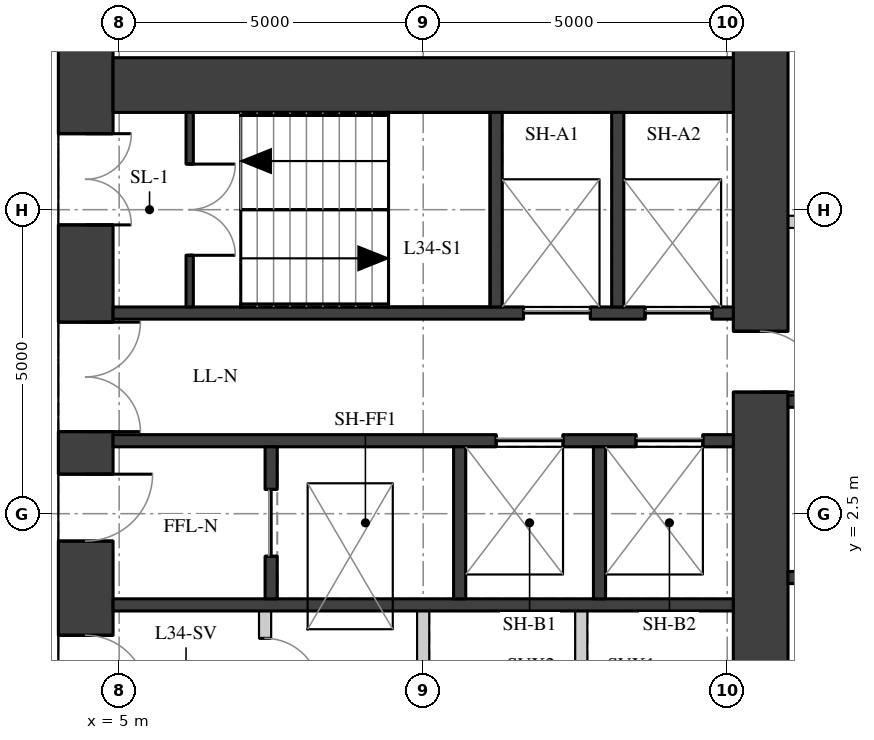
"""IFC4 building model, lengths in metres.
Left out: names, types, materials, properties, quantities, classifications, styles, units other than length and angle.
Written with IfcOpenShell. Run it as: python <this file> out.ifc"""

import sys

from ifc_helpers import new_model, si_unit, direction, frame, frame_2d, origin, place, context, subcontext, project, spatial, rectangle, extrude, element, fill, save


model = new_model("IFC4")
c1 = context("Model", 3, precision=1e-05, world=origin(), true_north=direction((0.0, 1.0)))
c2 = subcontext(c1, "Body", "Model", "MODEL_VIEW")
j1 = project(units=[si_unit("LENGTHUNIT", "METRE"), si_unit("PLANEANGLEUNIT", "RADIAN")], contexts=[c1])
p1 = place(None, origin())
s1 = spatial("IfcSite", under=j1, at=p1, CompositionType="ELEMENT")
p2 = place(p1, origin())
s2 = spatial("IfcBuilding", under=s1, at=p2, CompositionType="ELEMENT")
p3 = place(p2, frame((0.0, 0.0, 121.9)))
s3 = spatial("IfcBuildingStorey", under=s2, at=p3, CompositionType="ELEMENT", Elevation=121.9)
p4 = place(p3, frame((4.45, -11.1, 0.0), z_axis=(0.0, 0.0, 1.0), x_axis=(0.0, 1.0, 0.0)))
e1 = element("IfcWall", 1, at=p4, inside=s3, PredefinedType="SHEAR", context=c2, shape_type="SweptSolid", body=[
    extrude(rectangle(XDim=22.2, YDim=0.9, at=frame_2d((11.1, 0.0))), origin(), (0.0, 0.0, 1.0), 3.02),
])
p5 = place(p4, frame((2.35, 0.0, 0.0)))
e2 = element("IfcOpeningElement", 2, at=p5, cuts=e1, PredefinedType="OPENING", context=c2, shape_type="SweptSolid", body=[
    extrude(rectangle(XDim=1.5, YDim=2.1, at=frame_2d((0.75, 1.05))), frame((0.0, 0.46, 0.0), z_axis=(0.0, -1.0, 0.0), x_axis=(1.0, 0.0, 0.0)), (0.0, 0.0, 1.0), 0.92),
])
p6 = place(p4, frame((5.45, 0.0, 0.0)))
e3 = element("IfcOpeningElement", 3, at=p6, cuts=e1, PredefinedType="OPENING", context=c2, shape_type="SweptSolid", body=[
    extrude(rectangle(XDim=1.8, YDim=2.1, at=frame_2d((0.9, 1.05))), frame((0.0, 0.46, 0.0), z_axis=(0.0, -1.0, 0.0), x_axis=(1.0, 0.0, 0.0)), (0.0, 0.0, 1.0), 0.92),
])
p7 = place(p4, frame((7.95, 0.0, 0.0)))
e4 = element("IfcOpeningElement", 4, at=p7, cuts=e1, PredefinedType="OPENING", context=c2, shape_type="SweptSolid", body=[
    extrude(rectangle(XDim=1.1, YDim=2.1, at=frame_2d((0.55, 1.05))), frame((0.0, 0.46, 0.0), z_axis=(0.0, -1.0, 0.0), x_axis=(1.0, 0.0, 0.0)), (0.0, 0.0, 1.0), 0.92),
])
p8 = place(p4, frame((10.6, 0.0, 0.0)))
e5 = element("IfcOpeningElement", 5, at=p8, cuts=e1, PredefinedType="OPENING", context=c2, shape_type="SweptSolid", body=[
    extrude(rectangle(XDim=1.0, YDim=2.1, at=frame_2d((0.5, 1.05))), frame((0.0, 0.46, 0.0), z_axis=(0.0, -1.0, 0.0), x_axis=(1.0, 0.0, 0.0)), (0.0, 0.0, 1.0), 0.92),
])
p9 = place(p4, frame((13.15, 0.0, 0.0)))
e6 = element("IfcOpeningElement", 6, at=p9, cuts=e1, PredefinedType="OPENING", context=c2, shape_type="SweptSolid", body=[
    extrude(rectangle(XDim=1.1, YDim=2.1, at=frame_2d((0.55, 1.05))), frame((0.0, 0.46, 0.0), z_axis=(0.0, -1.0, 0.0), x_axis=(1.0, 0.0, 0.0)), (0.0, 0.0, 1.0), 0.92),
])
p10 = place(p4, frame((14.95, 0.0, 0.0)))
e7 = element("IfcOpeningElement", 7, at=p10, cuts=e1, PredefinedType="OPENING", context=c2, shape_type="SweptSolid", body=[
    extrude(rectangle(XDim=1.8, YDim=2.1, at=frame_2d((0.9, 1.05))), frame((0.0, 0.46, 0.0), z_axis=(0.0, -1.0, 0.0), x_axis=(1.0, 0.0, 0.0)), (0.0, 0.0, 1.0), 0.92),
])
p11 = place(p4, frame((18.35, 0.0, 0.0)))
e8 = element("IfcOpeningElement", 8, at=p11, cuts=e1, PredefinedType="OPENING", context=c2, shape_type="SweptSolid", body=[
    extrude(rectangle(XDim=1.5, YDim=2.1, at=frame_2d((0.75, 1.05))), frame((0.0, 0.46, 0.0), z_axis=(0.0, -1.0, 0.0), x_axis=(1.0, 0.0, 0.0)), (0.0, 0.0, 1.0), 0.92),
])
p12 = place(p3, frame((15.55, -11.1, 0.0), z_axis=(0.0, 0.0, 1.0), x_axis=(0.0, 1.0, 0.0)))
e9 = element("IfcWall", 9, at=p12, inside=s3, PredefinedType="SHEAR", context=c2, shape_type="SweptSolid", body=[
    extrude(rectangle(XDim=22.2, YDim=0.9, at=frame_2d((11.1, 0.0))), origin(), (0.0, 0.0, 1.0), 3.02),
])
p13 = place(p12, frame((15.6, 0.0, 0.0)))
e10 = element("IfcOpeningElement", 10, at=p13, cuts=e9, PredefinedType="OPENING", context=c2, shape_type="SweptSolid", body=[
    extrude(rectangle(XDim=1.0, YDim=2.1, at=frame_2d((0.5, 1.05))), frame((0.0, 0.46, 0.0), z_axis=(0.0, -1.0, 0.0), x_axis=(1.0, 0.0, 0.0)), (0.0, 0.0, 1.0), 0.92),
])
p14 = place(p12, frame((5.6, 0.0, 0.0)))
e11 = element("IfcOpeningElement", 11, at=p14, cuts=e9, PredefinedType="OPENING", context=c2, shape_type="SweptSolid", body=[
    extrude(rectangle(XDim=1.0, YDim=2.1, at=frame_2d((0.5, 1.05))), frame((0.0, 0.46, 0.0), z_axis=(0.0, -1.0, 0.0), x_axis=(1.0, 0.0, 0.0)), (0.0, 0.0, 1.0), 0.92),
])
p15 = place(p3, frame((4.9, 9.55, 0.0), z_axis=(0.0, 0.0, 1.0), x_axis=(1.0, 0.0, 0.0)))
e12 = element("IfcWall", 12, at=p15, inside=s3, PredefinedType="SHEAR", context=c2, shape_type="SweptSolid", body=[
    extrude(rectangle(XDim=10.2, YDim=0.9, at=frame_2d((5.1, 0.0))), origin(), (0.0, 0.0, 1.0), 3.02),
])
p16 = place(p3, frame((4.9, 5.8, 0.0), z_axis=(0.0, 0.0, 1.0), x_axis=(1.0, 0.0, 0.0)))
e13 = element("IfcWall", 13, at=p16, inside=s3, PredefinedType="SHEAR", context=c2, shape_type="SweptSolid", body=[
    extrude(rectangle(XDim=10.2, YDim=0.2, at=frame_2d((5.1, 0.0))), origin(), (0.0, 0.0, 1.0), 3.02),
])
p17 = place(p16, frame((6.75, 0.0, 0.0)))
e14 = element("IfcOpeningElement", 14, at=p17, cuts=e13, PredefinedType="OPENING", context=c2, shape_type="SweptSolid", body=[
    extrude(rectangle(XDim=1.1, YDim=2.1, at=frame_2d((0.55, 1.05))), frame((0.0, 0.11, 0.0), z_axis=(0.0, -1.0, 0.0), x_axis=(1.0, 0.0, 0.0)), (0.0, 0.0, 1.0), 0.22),
])
p18 = place(p16, frame((8.75, 0.0, 0.0)))
e15 = element("IfcOpeningElement", 15, at=p18, cuts=e13, PredefinedType="OPENING", context=c2, shape_type="SweptSolid", body=[
    extrude(rectangle(XDim=1.1, YDim=2.1, at=frame_2d((0.55, 1.05))), frame((0.0, 0.11, 0.0), z_axis=(0.0, -1.0, 0.0), x_axis=(1.0, 0.0, 0.0)), (0.0, 0.0, 1.0), 0.22),
])
p19 = place(p3, frame((4.9, 3.7, 0.0), z_axis=(0.0, 0.0, 1.0), x_axis=(1.0, 0.0, 0.0)))
e16 = element("IfcWall", 16, at=p19, inside=s3, PredefinedType="SHEAR", context=c2, shape_type="SweptSolid", body=[
    extrude(rectangle(XDim=10.2, YDim=0.2, at=frame_2d((5.1, 0.0))), origin(), (0.0, 0.0, 1.0), 3.02),
])
p20 = place(p19, frame((6.3, 0.0, 0.0)))
e17 = element("IfcOpeningElement", 17, at=p20, cuts=e16, PredefinedType="OPENING", context=c2, shape_type="SweptSolid", body=[
    extrude(rectangle(XDim=1.1, YDim=2.1, at=frame_2d((0.55, 1.05))), frame((0.0, 0.11, 0.0), z_axis=(0.0, -1.0, 0.0), x_axis=(1.0, 0.0, 0.0)), (0.0, 0.0, 1.0), 0.22),
])
p21 = place(p19, frame((8.6, 0.0, 0.0)))
e18 = element("IfcOpeningElement", 18, at=p21, cuts=e16, PredefinedType="OPENING", context=c2, shape_type="SweptSolid", body=[
    extrude(rectangle(XDim=1.1, YDim=2.1, at=frame_2d((0.55, 1.05))), frame((0.0, 0.11, 0.0), z_axis=(0.0, -1.0, 0.0), x_axis=(1.0, 0.0, 0.0)), (0.0, 0.0, 1.0), 0.22),
])
p22 = place(p3, frame((4.9, 1.0, 0.0), z_axis=(0.0, 0.0, 1.0), x_axis=(1.0, 0.0, 0.0)))
e19 = element("IfcWall", 19, at=p22, inside=s3, PredefinedType="SHEAR", context=c2, shape_type="SweptSolid", body=[
    extrude(rectangle(XDim=10.2, YDim=0.2, at=frame_2d((5.1, 0.0))), origin(), (0.0, 0.0, 1.0), 3.02),
])
for number, where, z_axis, x_axis in (
    (20, (11.2, 5.9, 0.0), (0.0, 0.0, 1.0), (0.0, 1.0, 0.0)),
    (21, (13.2, 5.9, 0.0), (0.0, 0.0, 1.0), (0.0, 1.0, 0.0)),
):
    element("IfcWall", number, at=place(p3, frame(where, z_axis=z_axis, x_axis=x_axis)), inside=s3, PredefinedType="SHEAR", context=c2, shape_type="SweptSolid", body=[
        extrude(rectangle(XDim=3.2, YDim=0.2, at=frame_2d((1.6, 0.0))), origin(), (0.0, 0.0, 1.0), 3.02),
    ])
p23 = place(p3, frame((7.5, 1.1, 0.0), z_axis=(0.0, 0.0, 1.0), x_axis=(0.0, 1.0, 0.0)))
e22 = element("IfcWall", 22, at=p23, inside=s3, PredefinedType="SHEAR", context=c2, shape_type="SweptSolid", body=[
    extrude(rectangle(XDim=2.5, YDim=0.2, at=frame_2d((1.25, 0.0))), origin(), (0.0, 0.0, 1.0), 3.02),
])
p24 = place(p23, frame((0.7, 0.0, 0.0)))
e23 = element("IfcOpeningElement", 23, at=p24, cuts=e22, PredefinedType="OPENING", context=c2, shape_type="SweptSolid", body=[
    extrude(rectangle(XDim=1.1, YDim=2.1, at=frame_2d((0.55, 1.05))), frame((0.0, 0.11, 0.0), z_axis=(0.0, -1.0, 0.0), x_axis=(1.0, 0.0, 0.0)), (0.0, 0.0, 1.0), 0.22),
])
for number, where, z_axis, x_axis in (
    (24, (10.6, 1.1, 0.0), (0.0, 0.0, 1.0), (0.0, 1.0, 0.0)),
    (25, (12.9, 1.1, 0.0), (0.0, 0.0, 1.0), (0.0, 1.0, 0.0)),
):
    element("IfcWall", number, at=place(p3, frame(where, z_axis=z_axis, x_axis=x_axis)), inside=s3, PredefinedType="SHEAR", context=c2, shape_type="SweptSolid", body=[
        extrude(rectangle(XDim=2.5, YDim=0.2, at=frame_2d((1.25, 0.0))), origin(), (0.0, 0.0, 1.0), 3.02),
    ])
p25 = place(p3, frame((6.16, 5.9, 0.0), z_axis=(0.0, 0.0, 1.0), x_axis=(0.0, 1.0, 0.0)))
e26 = element("IfcWall", 26, at=p25, inside=s3, PredefinedType="SHEAR", context=c2, shape_type="SweptSolid", body=[
    extrude(rectangle(XDim=3.2, YDim=0.12, at=frame_2d((1.6, 0.0))), origin(), (0.0, 0.0, 1.0), 3.02),
])
p26 = place(p25, frame((0.85, 0.0, 0.0)))
e27 = element("IfcOpeningElement", 27, at=p26, cuts=e26, PredefinedType="OPENING", context=c2, shape_type="SweptSolid", body=[
    extrude(rectangle(XDim=1.5, YDim=2.1, at=frame_2d((0.75, 1.05))), frame((0.0, 0.07, 0.0), z_axis=(0.0, -1.0, 0.0), x_axis=(1.0, 0.0, 0.0)), (0.0, 0.0, 1.0), 0.14),
])
p27 = place(p3, frame((7.4, -0.9, 0.0), z_axis=(0.0, 0.0, 1.0), x_axis=(0.0, 1.0, 0.0)))
e28 = element("IfcWall", 28, at=p27, inside=s3, PredefinedType="PARTITIONING", context=c2, shape_type="SweptSolid", body=[
    extrude(rectangle(XDim=1.8, YDim=0.2, at=frame_2d((0.9, 0.0))), origin(), (0.0, 0.0, 1.0), 3.02),
])
p28 = place(p27, frame((0.45, 0.0, 0.0)))
e29 = element("IfcOpeningElement", 29, at=p28, cuts=e28, PredefinedType="OPENING", context=c2, shape_type="SweptSolid", body=[
    extrude(rectangle(XDim=0.9, YDim=2.1, at=frame_2d((0.45, 1.05))), frame((0.0, 0.11, 0.0), z_axis=(0.0, -1.0, 0.0), x_axis=(1.0, 0.0, 0.0)), (0.0, 0.0, 1.0), 0.22),
])
for number, where, z_axis, x_axis in (
    (30, (10.0, -0.9, 0.0), (0.0, 0.0, 1.0), (0.0, 1.0, 0.0)),
    (31, (12.6, -0.9, 0.0), (0.0, 0.0, 1.0), (0.0, 1.0, 0.0)),
):
    element("IfcWall", number, at=place(p3, frame(where, z_axis=z_axis, x_axis=x_axis)), inside=s3, PredefinedType="PARTITIONING", context=c2, shape_type="SweptSolid", body=[
        extrude(rectangle(XDim=1.8, YDim=0.2, at=frame_2d((0.9, 0.0))), origin(), (0.0, 0.0, 1.0), 3.02),
    ])
for number, where, z_axis, x_axis in (
    (32, (16.0, 1.45, 0.0), (0.0, 0.0, 1.0), (1.0, 0.0, 0.0)),
    (33, (16.0, 4.35, 0.0), (0.0, 0.0, 1.0), (1.0, 0.0, 0.0)),
):
    element("IfcWall", number, at=place(p3, frame(where, z_axis=z_axis, x_axis=x_axis)), inside=s3, PredefinedType="SHEAR", context=c2, shape_type="SweptSolid", body=[
        extrude(rectangle(XDim=2.3, YDim=0.2, at=frame_2d((1.15, 0.0))), origin(), (0.0, 0.0, 1.0), 3.02),
    ])
p29 = place(p3, frame((16.0, 7.3, 0.0), z_axis=(0.0, 0.0, 1.0), x_axis=(1.0, 0.0, 0.0)))
e34 = element("IfcWall", 34, at=p29, inside=s3, PredefinedType="PARTITIONING", context=c2, shape_type="SweptSolid", body=[
    extrude(rectangle(XDim=2.3, YDim=0.2, at=frame_2d((1.15, 0.0))), origin(), (0.0, 0.0, 1.0), 3.02),
])
p30 = place(p29, frame((0.2, 0.0, 0.0)))
e35 = element("IfcOpeningElement", 35, at=p30, cuts=e34, PredefinedType="OPENING", context=c2, shape_type="SweptSolid", body=[
    extrude(rectangle(XDim=0.9, YDim=2.1, at=frame_2d((0.45, 1.05))), frame((0.0, 0.11, 0.0), z_axis=(0.0, -1.0, 0.0), x_axis=(1.0, 0.0, 0.0)), (0.0, 0.0, 1.0), 0.22),
])
p31 = place(p8, origin())
e36 = element("IfcDoor", 36, at=p31, inside=s3, OperationType="SINGLE_SWING_RIGHT", PredefinedType="DOOR", context=c2, shape_type="SweptSolid", body=[
    extrude(rectangle(XDim=1.0, YDim=2.1, at=frame_2d((0.5, 1.05))), frame((0.0, 0.025, 0.0), z_axis=(0.0, -1.0, 0.0), x_axis=(1.0, 0.0, 0.0)), (0.0, 0.0, 1.0), 0.05),
])
fill(e5, e36)
p32 = place(p9, origin())
e37 = element("IfcDoor", 37, at=p32, inside=s3, OperationType="SINGLE_SWING_LEFT", PredefinedType="DOOR", context=c2, shape_type="SweptSolid", body=[
    extrude(rectangle(XDim=1.1, YDim=2.1, at=frame_2d((0.55, 1.05))), frame((0.0, 0.025, 0.0), z_axis=(0.0, -1.0, 0.0), x_axis=(1.0, 0.0, 0.0)), (0.0, 0.0, 1.0), 0.05),
])
fill(e6, e37)
p33 = place(p10, origin())
e38 = element("IfcDoor", 38, at=p33, inside=s3, OperationType="DOUBLE_DOOR_SINGLE_SWING", PredefinedType="DOOR", context=c2, shape_type="SweptSolid", body=[
    extrude(rectangle(XDim=1.8, YDim=2.1, at=frame_2d((0.9, 1.05))), frame((0.0, 0.025, 0.0), z_axis=(0.0, -1.0, 0.0), x_axis=(1.0, 0.0, 0.0)), (0.0, 0.0, 1.0), 0.05),
])
fill(e7, e38)
p34 = place(p11, origin())
e39 = element("IfcDoor", 39, at=p34, inside=s3, OperationType="DOUBLE_DOOR_SINGLE_SWING", PredefinedType="DOOR", context=c2, shape_type="SweptSolid", body=[
    extrude(rectangle(XDim=1.5, YDim=2.1, at=frame_2d((0.75, 1.05))), frame((0.0, 0.025, 0.0), z_axis=(0.0, -1.0, 0.0), x_axis=(1.0, 0.0, 0.0)), (0.0, 0.0, 1.0), 0.05),
])
fill(e8, e39)
p35 = place(p26, origin())
e40 = element("IfcDoor", 40, at=p35, inside=s3, OperationType="DOUBLE_DOOR_SINGLE_SWING", PredefinedType="DOOR", context=c2, shape_type="SweptSolid", body=[
    extrude(rectangle(XDim=1.5, YDim=2.1, at=frame_2d((0.75, 1.05))), frame((0.0, 0.025, 0.0), z_axis=(0.0, -1.0, 0.0), x_axis=(1.0, 0.0, 0.0)), (0.0, 0.0, 1.0), 0.05),
])
fill(e27, e40)
p36 = place(p17, origin())
e41 = element("IfcDoor", 41, at=p36, inside=s3, OperationType="DOUBLE_DOOR_SLIDING", PredefinedType="DOOR", context=c2, shape_type="SweptSolid", body=[
    extrude(rectangle(XDim=1.1, YDim=2.1, at=frame_2d((0.55, 1.05))), frame((0.0, 0.025, 0.0), z_axis=(0.0, -1.0, 0.0), x_axis=(1.0, 0.0, 0.0)), (0.0, 0.0, 1.0), 0.05),
])
fill(e14, e41)
p37 = place(p18, origin())
e42 = element("IfcDoor", 42, at=p37, inside=s3, OperationType="DOUBLE_DOOR_SLIDING", PredefinedType="DOOR", context=c2, shape_type="SweptSolid", body=[
    extrude(rectangle(XDim=1.1, YDim=2.1, at=frame_2d((0.55, 1.05))), frame((0.0, 0.025, 0.0), z_axis=(0.0, -1.0, 0.0), x_axis=(1.0, 0.0, 0.0)), (0.0, 0.0, 1.0), 0.05),
])
fill(e15, e42)
p38 = place(p20, origin())
e43 = element("IfcDoor", 43, at=p38, inside=s3, OperationType="DOUBLE_DOOR_SLIDING", PredefinedType="DOOR", context=c2, shape_type="SweptSolid", body=[
    extrude(rectangle(XDim=1.1, YDim=2.1, at=frame_2d((0.55, 1.05))), frame((0.0, 0.025, 0.0), z_axis=(0.0, -1.0, 0.0), x_axis=(1.0, 0.0, 0.0)), (0.0, 0.0, 1.0), 0.05),
])
fill(e17, e43)
p39 = place(p21, origin())
e44 = element("IfcDoor", 44, at=p39, inside=s3, OperationType="DOUBLE_DOOR_SLIDING", PredefinedType="DOOR", context=c2, shape_type="SweptSolid", body=[
    extrude(rectangle(XDim=1.1, YDim=2.1, at=frame_2d((0.55, 1.05))), frame((0.0, 0.025, 0.0), z_axis=(0.0, -1.0, 0.0), x_axis=(1.0, 0.0, 0.0)), (0.0, 0.0, 1.0), 0.05),
])
fill(e18, e44)
p40 = place(p24, origin())
e45 = element("IfcDoor", 45, at=p40, inside=s3, OperationType="DOUBLE_DOOR_SLIDING", PredefinedType="DOOR", context=c2, shape_type="SweptSolid", body=[
    extrude(rectangle(XDim=1.1, YDim=2.1, at=frame_2d((0.55, 1.05))), frame((0.0, 0.025, 0.0), z_axis=(0.0, -1.0, 0.0), x_axis=(1.0, 0.0, 0.0)), (0.0, 0.0, 1.0), 0.05),
])
fill(e23, e45)
p41 = place(p28, origin())
e46 = element("IfcDoor", 46, at=p41, inside=s3, OperationType="SINGLE_SWING_RIGHT", PredefinedType="DOOR", context=c2, shape_type="SweptSolid", body=[
    extrude(rectangle(XDim=0.9, YDim=2.1, at=frame_2d((0.45, 1.05))), frame((0.0, 0.025, 0.0), z_axis=(0.0, -1.0, 0.0), x_axis=(1.0, 0.0, 0.0)), (0.0, 0.0, 1.0), 0.05),
])
fill(e29, e46)
p42 = place(p13, origin())
e47 = element("IfcDoor", 47, at=p42, inside=s3, OperationType="SINGLE_SWING_RIGHT", PredefinedType="DOOR", context=c2, shape_type="SweptSolid", body=[
    extrude(rectangle(XDim=1.0, YDim=2.1, at=frame_2d((0.5, 1.05))), frame((0.0, 0.025, 0.0), z_axis=(0.0, -1.0, 0.0), x_axis=(1.0, 0.0, 0.0)), (0.0, 0.0, 1.0), 0.05),
])
fill(e10, e47)
save(model, sys.argv[1])
